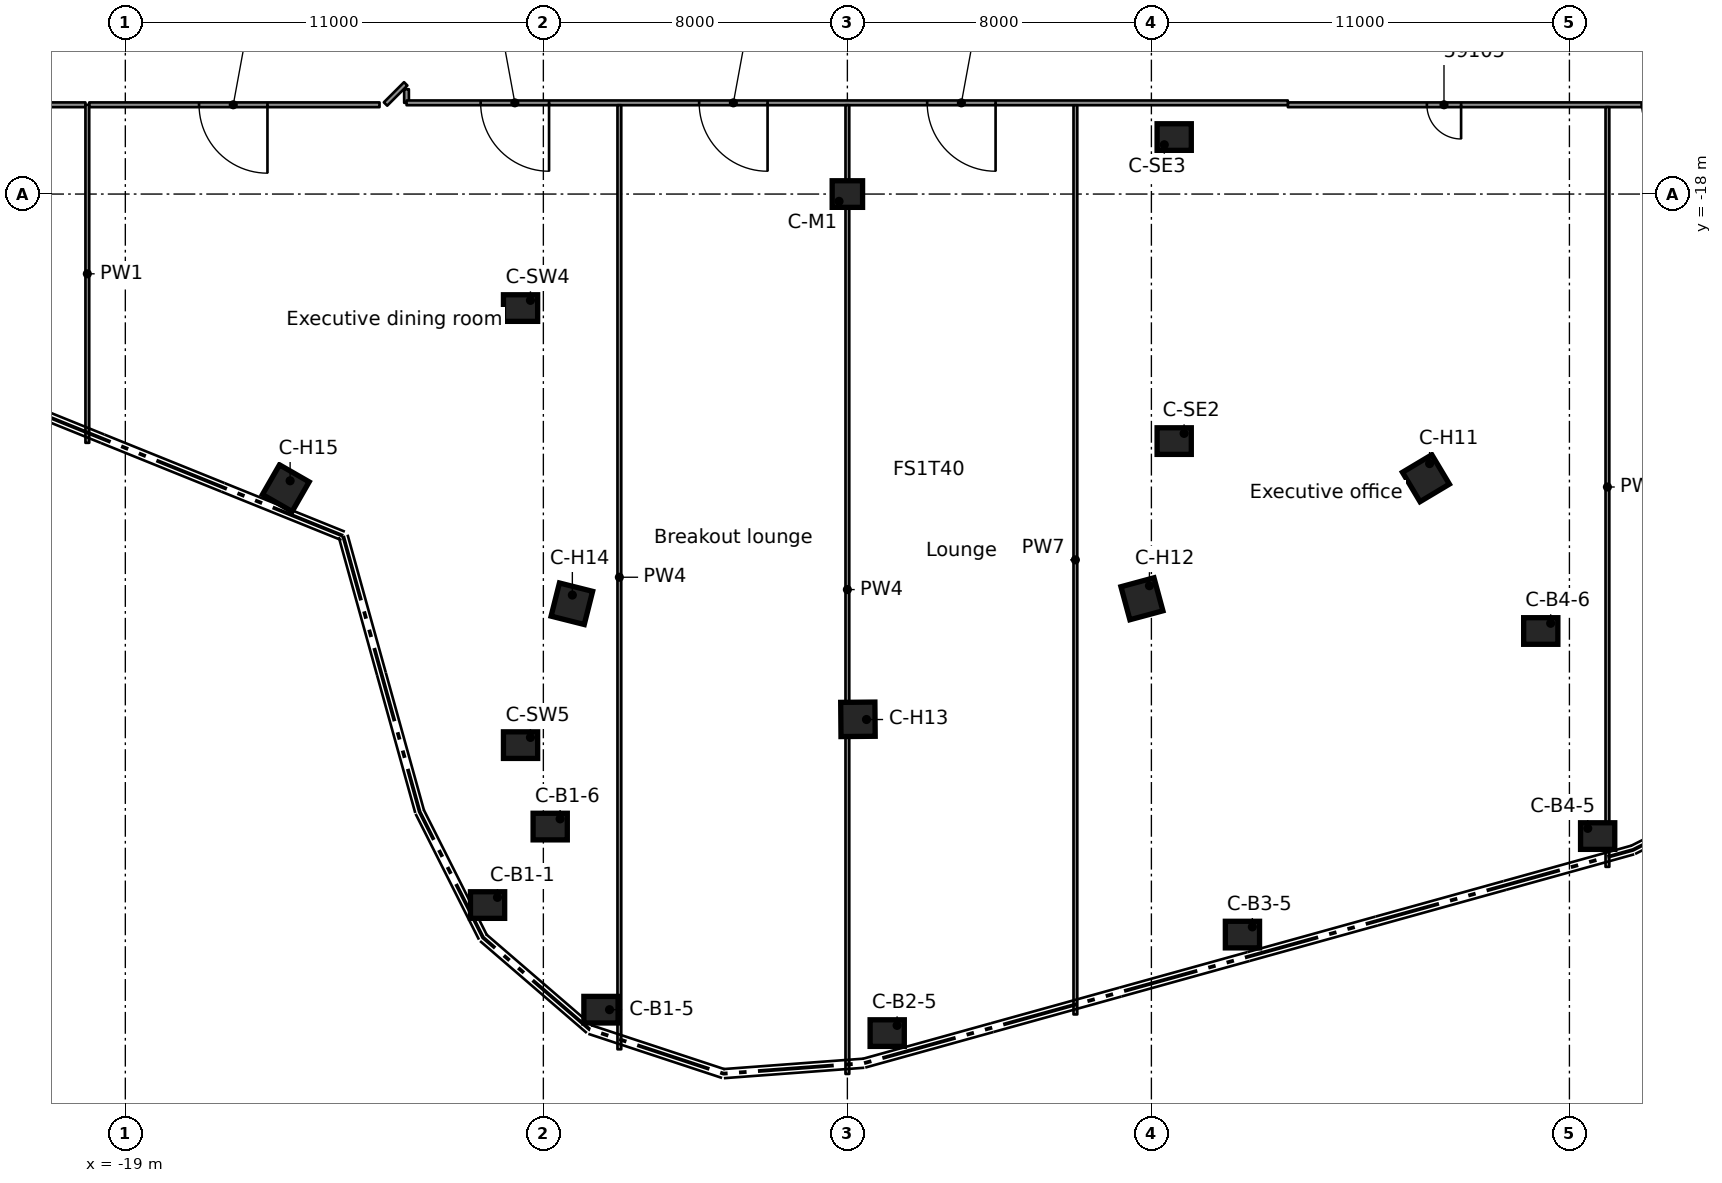
"""IFC4 building model, lengths in metres.
Left out: names, types, materials, properties, quantities, classifications, styles, units other than length and angle.
Written with IfcOpenShell. Run it as: python <this file> out.ifc"""

import sys

from ifc_helpers import new_model, si_unit, direction, frame, frame_2d, origin, origin_2d, place, context, subcontext, project, spatial, rectangle, extrude, element, fill, save


model = new_model("IFC4")
c1 = context("Model", 3, precision=1e-05, world=origin(), true_north=direction((0.0, 1.0)))
c2 = subcontext(c1, "Body", "Model", "MODEL_VIEW")
j1 = project(units=[si_unit("LENGTHUNIT", "METRE"), si_unit("PLANEANGLEUNIT", "RADIAN")], contexts=[c1])
p1 = place(None, origin())
s1 = spatial("IfcSite", under=j1, at=p1, CompositionType="ELEMENT")
p2 = place(p1, origin())
s2 = spatial("IfcBuilding", under=s1, at=p2, CompositionType="ELEMENT")
p3 = place(p2, frame((0.0, 0.0, 289.4)))
s3 = spatial("IfcBuildingStorey", under=s2, at=p3, CompositionType="ELEMENT", Elevation=289.4)
for number, where, z_axis, x_axis in (
    (1, (-9.468, -36.708, 0.0), (0.0, 0.0, 1.0), (1.0, 0.0, 0.0)),
    (2, (-6.484, -39.461, 0.0), (0.0, 0.0, 1.0), (1.0, 0.0, 0.0)),
    (3, (-7.82, -34.643, 0.0), (0.0, 0.0, 1.0), (1.0, 0.0, 0.0)),
    (4, (1.048, -40.077, 0.0), (0.0, 0.0, 1.0), (1.0, 0.0, 0.0)),
    (5, (10.396, -37.485, 0.0), (0.0, 0.0, 1.0), (1.0, 0.0, 0.0)),
    (6, (19.743, -34.893, 0.0), (0.0, 0.0, 1.0), (1.0, 0.0, 0.0)),
    (7, (18.246, -29.497, 0.0), (0.0, 0.0, 1.0), (1.0, 0.0, 0.0)),
):
    element("IfcColumn", number, at=place(p3, frame(where, z_axis=z_axis, x_axis=x_axis)), inside=s3, PredefinedType="COLUMN", context=c2, shape_type="SweptSolid", body=[
        extrude(rectangle(XDim=0.9, YDim=0.7, at=origin_2d()), origin(), (0.0, 0.0, 1.0), 3.5),
    ])
for number, where, z_axis, x_axis in (
    (8, (15.224, -25.477, 0.0), (0.0, 0.0, 1.0), (0.513, -0.858, 0.0)),
    (9, (7.751, -28.649, 0.0), (0.0, 0.0, 1.0), (0.261, -0.965, 0.0)),
    (10, (0.278, -31.821, 0.0), (0.0, 0.0, 1.0), (0.009, -1.0, 0.0)),
    (11, (-7.25, -28.78, 0.0), (0.0, 0.0, 1.0), (-0.244, -0.97, 0.0)),
    (12, (-14.777, -25.739, 0.0), (0.0, 0.0, 1.0), (-0.498, -0.867, 0.0)),
):
    element("IfcColumn", number, at=place(p3, frame(where, z_axis=z_axis, x_axis=x_axis)), inside=s3, PredefinedType="COLUMN", context=c2, shape_type="SweptSolid", body=[
        extrude(rectangle(XDim=0.9, YDim=0.9, at=origin_2d()), origin(), (0.0, 0.0, 1.0), 3.5),
    ])
p4 = place(p3, frame((0.0, -18.0, 0.0), z_axis=(0.0, 0.0, 1.0), x_axis=(1.0, 0.0, 0.0)))
e13 = element("IfcColumn", 13, at=p4, inside=s3, PredefinedType="COLUMN", context=c2, shape_type="SweptSolid", body=[
    extrude(rectangle(XDim=0.8, YDim=0.7, at=origin_2d()), origin(), (0.0, 0.0, 1.0), 3.5),
])
for number, where, z_axis, x_axis in (
    (14, (8.6, -24.5, 0.0), (0.0, 0.0, 1.0), (1.0, 0.0, 0.0)),
    (15, (8.6, -16.5, 0.0), (0.0, 0.0, 1.0), (1.0, 0.0, 0.0)),
    (16, (-8.6, -21.0, 0.0), (0.0, 0.0, 1.0), (1.0, 0.0, 0.0)),
    (17, (-8.6, -32.5, 0.0), (0.0, 0.0, 1.0), (1.0, 0.0, 0.0)),
):
    element("IfcColumn", number, at=place(p3, frame(where, z_axis=z_axis, x_axis=x_axis)), inside=s3, PredefinedType="COLUMN", context=c2, shape_type="SweptSolid", body=[
        extrude(rectangle(XDim=0.9, YDim=0.7, at=origin_2d()), origin(), (0.0, 0.0, 1.0), 3.5),
    ])
p5 = place(p3, frame((-11.601, -15.242, 0.0), z_axis=(0.0, 0.0, 1.0), x_axis=(0.002726642898, -0.999996282702, 0.0)))
e18 = element("IfcWall", 18, at=p5, inside=s3, PredefinedType="PARTITIONING", context=c2, shape_type="SweptSolid", body=[
    extrude(rectangle(XDim=0.358, YDim=0.125, at=frame_2d((0.179, 0.0))), origin(), (0.0, 0.0, 1.0), 3.15),
])
p6 = place(p3, frame((-12.311, -15.651, 0.0), z_axis=(0.0, 0.0, 1.0), x_axis=(-1.0, 0.0, 0.0)))
e19 = element("IfcWall", 19, at=p6, inside=s3, PredefinedType="PARTITIONING", context=c2, shape_type="SweptSolid", body=[
    extrude(rectangle(XDim=7.639, YDim=0.125, at=frame_2d((3.819, 0.0))), origin(), (0.0, 0.0, 1.0), 3.15),
])
p7 = place(p6, frame((2.949, 0.0, 0.0)))
e20 = element("IfcOpeningElement", 20, at=p7, cuts=e19, PredefinedType="OPENING", context=c2, shape_type="SweptSolid", body=[
    extrude(rectangle(XDim=1.8, YDim=2.1, at=frame_2d((0.9, 1.05))), frame((0.0, 0.073, 0.0), z_axis=(0.0, -1.0, 0.0), x_axis=(1.0, 0.0, 0.0)), (0.0, 0.0, 1.0), 0.145),
])
p8 = place(p3, frame((22.587, -15.651, 0.0), z_axis=(0.0, 0.0, 1.0), x_axis=(-1.0, 0.0, 0.0)))
e21 = element("IfcWall", 21, at=p8, inside=s3, PredefinedType="PARTITIONING", context=c2, shape_type="SweptSolid", body=[
    extrude(rectangle(XDim=10.996, YDim=0.125, at=frame_2d((5.498, 0.0))), origin(), (0.0, 0.0, 1.0), 3.15),
])
p9 = place(p8, frame((6.438, 0.0, 0.0)))
e22 = element("IfcOpeningElement", 22, at=p9, cuts=e21, PredefinedType="OPENING", context=c2, shape_type="SweptSolid", body=[
    extrude(rectangle(XDim=0.9, YDim=2.1, at=frame_2d((0.45, 1.05))), frame((0.0, 0.073, 0.0), z_axis=(0.0, -1.0, 0.0), x_axis=(1.0, 0.0, 0.0)), (0.0, 0.0, 1.0), 0.145),
])
p10 = place(p8, frame((0.788, 0.0, 0.0)))
e23 = element("IfcOpeningElement", 23, at=p10, cuts=e21, PredefinedType="OPENING", context=c2, shape_type="SweptSolid", body=[
    extrude(rectangle(XDim=0.9, YDim=2.1, at=frame_2d((0.45, 1.05))), frame((0.0, 0.073, 0.0), z_axis=(0.0, -1.0, 0.0), x_axis=(1.0, 0.0, 0.0)), (0.0, 0.0, 1.0), 0.145),
])
p11 = place(p3, frame((-22.587, -15.651, 0.0), z_axis=(0.0, 0.0, 1.0), x_axis=(1.0, 0.0, 0.0)))
e24 = element("IfcWall", 24, at=p11, inside=s3, PredefinedType="PARTITIONING", context=c2, shape_type="SweptSolid", body=[
    extrude(rectangle(XDim=2.537, YDim=0.125, at=frame_2d((1.269, 0.0))), origin(), (0.0, 0.0, 1.0), 3.15),
])
p12 = place(p3, frame((11.59, -15.6, 0.0), z_axis=(0.0, 0.0, 1.0), x_axis=(-1.0, 0.0, 0.0)))
e25 = element("IfcWall", 25, at=p12, inside=s3, PredefinedType="PARTITIONING", context=c2, shape_type="SweptSolid", body=[
    extrude(rectangle(XDim=23.19, YDim=0.125, at=frame_2d((11.595, 0.0))), origin(), (0.0, 0.0, 1.0), 3.15),
])
p13 = place(p12, frame((19.44, 0.0, 0.0)))
e26 = element("IfcOpeningElement", 26, at=p13, cuts=e25, PredefinedType="OPENING", context=c2, shape_type="SweptSolid", body=[
    extrude(rectangle(XDim=1.8, YDim=2.1, at=frame_2d((0.9, 1.05))), frame((0.0, 0.073, 0.0), z_axis=(0.0, -1.0, 0.0), x_axis=(1.0, 0.0, 0.0)), (0.0, 0.0, 1.0), 0.145),
])
p14 = place(p12, frame((13.69, 0.0, 0.0)))
e27 = element("IfcOpeningElement", 27, at=p14, cuts=e25, PredefinedType="OPENING", context=c2, shape_type="SweptSolid", body=[
    extrude(rectangle(XDim=1.8, YDim=2.1, at=frame_2d((0.9, 1.05))), frame((0.0, 0.073, 0.0), z_axis=(0.0, -1.0, 0.0), x_axis=(1.0, 0.0, 0.0)), (0.0, 0.0, 1.0), 0.145),
])
p15 = place(p12, frame((7.69, 0.0, 0.0)))
e28 = element("IfcOpeningElement", 28, at=p15, cuts=e25, PredefinedType="OPENING", context=c2, shape_type="SweptSolid", body=[
    extrude(rectangle(XDim=1.8, YDim=2.1, at=frame_2d((0.9, 1.05))), frame((0.0, 0.073, 0.0), z_axis=(0.0, -1.0, 0.0), x_axis=(1.0, 0.0, 0.0)), (0.0, 0.0, 1.0), 0.145),
])
p16 = place(p3, frame((-12.153, -15.631, 0.0), z_axis=(0.0, 0.0, 1.0), x_axis=(0.707106781187, 0.707106781187, 0.0)))
e29 = element("IfcWall", 29, at=p16, inside=s3, PredefinedType="PARTITIONING", context=c2, shape_type="SweptSolid", body=[
    extrude(rectangle(XDim=0.751, YDim=0.125, at=frame_2d((0.375, 0.0))), origin(), (0.0, 0.0, 1.0), 3.15),
])
p17 = place(p3, frame((20.0, -35.703, 0.0), z_axis=(0.0, 0.0, 1.0), x_axis=(0.0, 1.0, 0.0)))
e30 = element("IfcWall", 30, at=p17, inside=s3, PredefinedType="PARTITIONING", context=c2, shape_type="SweptSolid", body=[
    extrude(rectangle(XDim=19.99, YDim=0.1, at=frame_2d((9.995, 0.0))), origin(), (0.0, 0.0, 1.0), 2.495),
])
p18 = place(p3, frame((6.0, -39.586, 0.0), z_axis=(0.0, 0.0, 1.0), x_axis=(0.0, 1.0, 0.0)))
e31 = element("IfcWall", 31, at=p18, inside=s3, PredefinedType="PARTITIONING", context=c2, shape_type="SweptSolid", body=[
    extrude(rectangle(XDim=23.922, YDim=0.1, at=frame_2d((11.961, 0.0))), origin(), (0.0, 0.0, 1.0), 2.203),
])
p19 = place(p3, frame((0.0, -41.152, 0.0), z_axis=(0.0, 0.0, 1.0), x_axis=(0.0, 1.0, 0.0)))
e32 = element("IfcWall", 32, at=p19, inside=s3, PredefinedType="PARTITIONING", context=c2, shape_type="SweptSolid", body=[
    extrude(rectangle(XDim=25.49, YDim=0.1, at=frame_2d((12.745, 0.0))), origin(), (0.0, 0.0, 1.0), 2.495),
])
p20 = place(p3, frame((-6.0, -40.503, 0.0), z_axis=(0.0, 0.0, 1.0), x_axis=(0.0, 1.0, 0.0)))
e33 = element("IfcWall", 33, at=p20, inside=s3, PredefinedType="PARTITIONING", context=c2, shape_type="SweptSolid", body=[
    extrude(rectangle(XDim=24.841, YDim=0.1, at=frame_2d((12.42, 0.0))), origin(), (0.0, 0.0, 1.0), 2.495),
])
p21 = place(p3, frame((-20.0, -24.546, 0.0), z_axis=(0.0, 0.0, 1.0), x_axis=(0.0, 1.0, 0.0)))
e34 = element("IfcWall", 34, at=p21, inside=s3, PredefinedType="PARTITIONING", context=c2, shape_type="SweptSolid", body=[
    extrude(rectangle(XDim=8.895, YDim=0.1, at=frame_2d((4.448, 0.0))), origin(), (0.0, 0.0, 1.0), 3.15),
])
p22 = place(p7, origin())
e35 = element("IfcDoor", 35, at=p22, inside=s3, OperationType="DOUBLE_DOOR_SINGLE_SWING", PredefinedType="DOOR", context=c2, shape_type="SweptSolid", body=[
    extrude(rectangle(XDim=1.8, YDim=2.1, at=frame_2d((0.9, 1.05))), frame((0.0, 0.025, 0.0), z_axis=(0.0, -1.0, 0.0), x_axis=(1.0, 0.0, 0.0)), (0.0, 0.0, 1.0), 0.05),
])
fill(e20, e35)
p23 = place(p13, origin())
e36 = element("IfcDoor", 36, at=p23, inside=s3, OperationType="DOUBLE_DOOR_SINGLE_SWING", PredefinedType="DOOR", context=c2, shape_type="SweptSolid", body=[
    extrude(rectangle(XDim=1.8, YDim=2.1, at=frame_2d((0.9, 1.05))), frame((0.0, 0.025, 0.0), z_axis=(0.0, -1.0, 0.0), x_axis=(1.0, 0.0, 0.0)), (0.0, 0.0, 1.0), 0.05),
])
fill(e26, e36)
p24 = place(p14, origin())
e37 = element("IfcDoor", 37, at=p24, inside=s3, OperationType="DOUBLE_DOOR_SINGLE_SWING", PredefinedType="DOOR", context=c2, shape_type="SweptSolid", body=[
    extrude(rectangle(XDim=1.8, YDim=2.1, at=frame_2d((0.9, 1.05))), frame((0.0, 0.025, 0.0), z_axis=(0.0, -1.0, 0.0), x_axis=(1.0, 0.0, 0.0)), (0.0, 0.0, 1.0), 0.05),
])
fill(e27, e37)
p25 = place(p15, origin())
e38 = element("IfcDoor", 38, at=p25, inside=s3, OperationType="DOUBLE_DOOR_SINGLE_SWING", PredefinedType="DOOR", context=c2, shape_type="SweptSolid", body=[
    extrude(rectangle(XDim=1.8, YDim=2.1, at=frame_2d((0.9, 1.05))), frame((0.0, 0.025, 0.0), z_axis=(0.0, -1.0, 0.0), x_axis=(1.0, 0.0, 0.0)), (0.0, 0.0, 1.0), 0.05),
])
fill(e28, e38)
p26 = place(p9, origin())
e39 = element("IfcDoor", 39, at=p26, inside=s3, OperationType="SINGLE_SWING_RIGHT", PredefinedType="DOOR", context=c2, shape_type="SweptSolid", body=[
    extrude(rectangle(XDim=0.9, YDim=2.1, at=frame_2d((0.45, 1.05))), frame((0.0, 0.025, 0.0), z_axis=(0.0, -1.0, 0.0), x_axis=(1.0, 0.0, 0.0)), (0.0, 0.0, 1.0), 0.05),
])
fill(e22, e39)
p27 = place(p10, origin())
e40 = element("IfcDoor", 40, at=p27, inside=s3, OperationType="SINGLE_SWING_LEFT", PredefinedType="DOOR", context=c2, shape_type="SweptSolid", body=[
    extrude(rectangle(XDim=0.9, YDim=2.1, at=frame_2d((0.45, 1.05))), frame((0.0, 0.025, 0.0), z_axis=(0.0, -1.0, 0.0), x_axis=(1.0, 0.0, 0.0)), (0.0, 0.0, 1.0), 0.05),
])
fill(e23, e40)
save(model, sys.argv[1])
